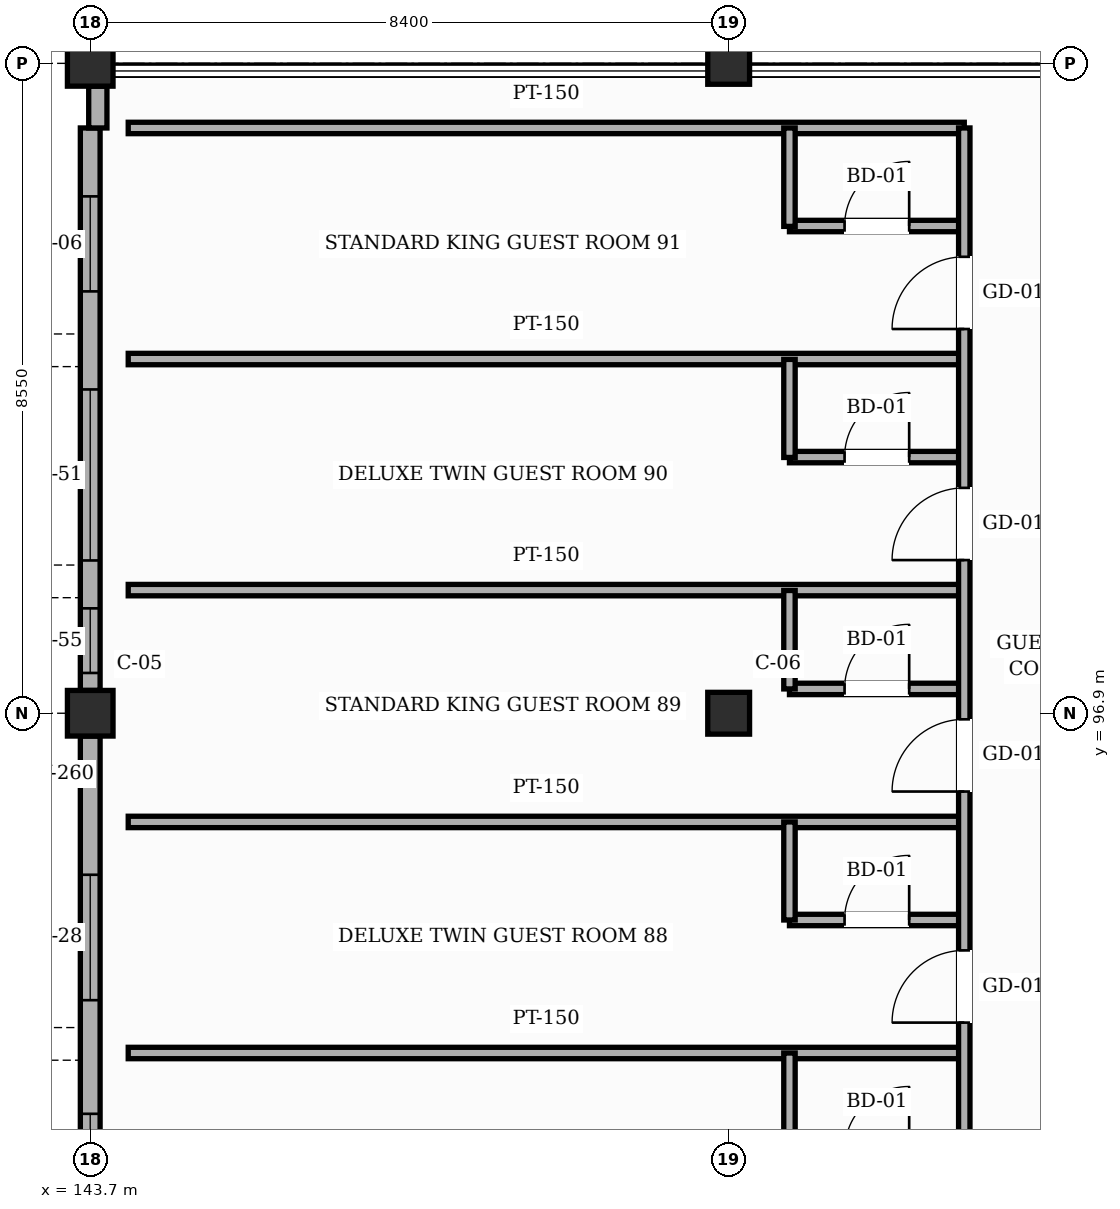
"""IFC4 building model, lengths in metres.
Left out: names, types, materials, properties, quantities, classifications, styles, units other than length and angle.
Written with IfcOpenShell. Run it as: python <this file> out.ifc"""

import sys

from ifc_helpers import new_model, si_unit, direction, frame, frame_2d, origin, origin_2d, place, context, subcontext, project, spatial, rectangle, hollow_rectangle, extrude, element, fill, save


model = new_model("IFC4")
c1 = context("Model", 3, precision=1e-05, world=origin(), true_north=direction((0.0, 1.0)))
c2 = subcontext(c1, "Body", "Model", "MODEL_VIEW")
j1 = project(units=[si_unit("LENGTHUNIT", "METRE"), si_unit("PLANEANGLEUNIT", "RADIAN")], contexts=[c1])
p1 = place(None, origin())
s1 = spatial("IfcSite", under=j1, at=p1, CompositionType="ELEMENT")
p2 = place(p1, origin())
s2 = spatial("IfcBuilding", under=s1, at=p2, CompositionType="ELEMENT")
p3 = place(p2, frame((0.0, 0.0, 24.6)))
s3 = spatial("IfcBuildingStorey", under=s2, at=p3, CompositionType="ELEMENT", Elevation=24.6)
for number, where, z_axis, x_axis in (
    (1, (143.7, 96.9, 0.0), (0.0, 0.0, 1.0), (1.0, 0.0, 0.0)),
    (2, (143.7, 105.45, 0.0), (0.0, 0.0, 1.0), (1.0, 0.0, 0.0)),
):
    element("IfcColumn", number, at=place(p3, frame(where, z_axis=z_axis, x_axis=x_axis)), inside=s3, PredefinedType="COLUMN", context=c2, shape_type="SweptSolid", body=[
        extrude(hollow_rectangle(XDim=0.6, YDim=0.6, WallThickness=0.025, InnerFilletRadius=0.025, OuterFilletRadius=0.05, at=origin_2d()), origin(), (0.0, 0.0, 1.0), 3.6),
    ])
for number, where, z_axis, x_axis in (
    (3, (152.1, 96.9, 0.0), (0.0, 0.0, 1.0), (1.0, 0.0, 0.0)),
    (4, (152.1, 105.45, 0.0), (0.0, 0.0, 1.0), (1.0, 0.0, 0.0)),
):
    element("IfcColumn", number, at=place(p3, frame(where, z_axis=z_axis, x_axis=x_axis)), inside=s3, PredefinedType="COLUMN", context=c2, shape_type="SweptSolid", body=[
        extrude(hollow_rectangle(XDim=0.55, YDim=0.55, WallThickness=0.022, InnerFilletRadius=0.022, OuterFilletRadius=0.044, at=origin_2d()), origin(), (0.0, 0.0, 1.0), 3.6),
    ])
p4 = place(p3, frame((143.7, 89.2, 0.0), z_axis=(0.0, 0.0, 1.0), x_axis=(0.0, 1.0, 0.0)))
e5 = element("IfcWall", 5, at=p4, inside=s3, PredefinedType="SOLIDWALL", context=c2, shape_type="SweptSolid", body=[
    extrude(rectangle(XDim=7.4, YDim=0.26, at=frame_2d((3.7, 0.0))), origin(), (0.0, 0.0, 1.0), 2.805),
])
p5 = place(p4, frame((0.98, 0.0, 0.85)))
e6 = element("IfcOpeningElement", 6, at=p5, cuts=e5, PredefinedType="OPENING", context=c2, shape_type="SweptSolid", body=[
    extrude(rectangle(XDim=1.45, YDim=1.65, at=frame_2d((0.725, 0.825))), frame((0.0, 0.14, 0.0), z_axis=(0.0, -1.0, 0.0), x_axis=(1.0, 0.0, 0.0)), (0.0, 0.0, 1.0), 0.28),
])
p6 = place(p4, frame((3.925, 0.0, 0.85)))
e7 = element("IfcOpeningElement", 7, at=p6, cuts=e5, PredefinedType="OPENING", context=c2, shape_type="SweptSolid", body=[
    extrude(rectangle(XDim=1.65, YDim=1.65, at=frame_2d((0.825, 0.825))), frame((0.0, 0.14, 0.0), z_axis=(0.0, -1.0, 0.0), x_axis=(1.0, 0.0, 0.0)), (0.0, 0.0, 1.0), 0.28),
])
p7 = place(p3, frame((143.7, 97.2, 0.0), z_axis=(0.0, 0.0, 1.0), x_axis=(0.0, 1.0, 0.0)))
e8 = element("IfcWall", 8, at=p7, inside=s3, PredefinedType="SOLIDWALL", context=c2, shape_type="SweptSolid", body=[
    extrude(rectangle(XDim=7.4, YDim=0.26, at=frame_2d((3.7, 0.0))), origin(), (0.0, 0.0, 1.0), 2.655),
])
p8 = place(p7, frame((0.23, 0.0, 0.85)))
e9 = element("IfcOpeningElement", 9, at=p8, cuts=e8, PredefinedType="OPENING", context=c2, shape_type="SweptSolid", body=[
    extrude(rectangle(XDim=0.85, YDim=1.35, at=frame_2d((0.425, 0.675))), frame((0.0, 0.14, 0.0), z_axis=(0.0, -1.0, 0.0), x_axis=(1.0, 0.0, 0.0)), (0.0, 0.0, 1.0), 0.28),
])
p9 = place(p7, frame((1.71, 0.0, 0.85)))
e10 = element("IfcOpeningElement", 10, at=p9, cuts=e8, PredefinedType="OPENING", context=c2, shape_type="SweptSolid", body=[
    extrude(rectangle(XDim=2.25, YDim=1.35, at=frame_2d((1.125, 0.675))), frame((0.0, 0.14, 0.0), z_axis=(0.0, -1.0, 0.0), x_axis=(1.0, 0.0, 0.0)), (0.0, 0.0, 1.0), 0.28),
])
p10 = place(p7, frame((5.25, 0.0, 0.85)))
e11 = element("IfcOpeningElement", 11, at=p10, cuts=e8, PredefinedType="OPENING", context=c2, shape_type="SweptSolid", body=[
    extrude(rectangle(XDim=1.25, YDim=1.35, at=frame_2d((0.625, 0.675))), frame((0.0, 0.14, 0.0), z_axis=(0.0, -1.0, 0.0), x_axis=(1.0, 0.0, 0.0)), (0.0, 0.0, 1.0), 0.28),
])
p11 = place(p3, frame((143.8, 104.6, 0.0), z_axis=(0.0, 0.0, 1.0), x_axis=(0.0, 1.0, 0.0)))
e12 = element("IfcWall", 12, at=p11, inside=s3, PredefinedType="SOLIDWALL", context=c2, shape_type="SweptSolid", body=[
    extrude(rectangle(XDim=0.55, YDim=0.24, at=frame_2d((0.275, 0.0))), origin(), (0.0, 0.0, 1.0), 2.655),
])
p12 = place(p3, frame((144.2, 92.43, 0.0), z_axis=(0.0, 0.0, 1.0), x_axis=(1.0, 0.0, 0.0)))
e13 = element("IfcWall", 13, at=p12, inside=s3, PredefinedType="PARTITIONING", context=c2, shape_type="SweptSolid", body=[
    extrude(rectangle(XDim=11.0, YDim=0.15, at=frame_2d((5.5, 0.0))), origin(), (0.0, 0.0, 1.0), 3.365),
])
p13 = place(p3, frame((152.9, 94.18, 0.0), z_axis=(0.0, 0.0, 1.0), x_axis=(1.0, 0.0, 0.0)))
e14 = element("IfcWall", 14, at=p13, inside=s3, PredefinedType="PARTITIONING", context=c2, shape_type="SweptSolid", body=[
    extrude(rectangle(XDim=2.3, YDim=0.15, at=frame_2d((1.15, 0.0))), origin(), (0.0, 0.0, 1.0), 3.365),
])
p14 = place(p13, frame((0.725, 0.0, 0.0)))
e15 = element("IfcOpeningElement", 15, at=p14, cuts=e14, PredefinedType="OPENING", context=c2, shape_type="SweptSolid", body=[
    extrude(rectangle(XDim=0.85, YDim=2.1, at=frame_2d((0.425, 1.05))), frame((0.0, 0.085, 0.0), z_axis=(0.0, -1.0, 0.0), x_axis=(1.0, 0.0, 0.0)), (0.0, 0.0, 1.0), 0.17),
])
p15 = place(p3, frame((144.2, 95.47, 0.0), z_axis=(0.0, 0.0, 1.0), x_axis=(1.0, 0.0, 0.0)))
e16 = element("IfcWall", 16, at=p15, inside=s3, PredefinedType="PARTITIONING", context=c2, shape_type="SweptSolid", body=[
    extrude(rectangle(XDim=11.0, YDim=0.15, at=frame_2d((5.5, 0.0))), origin(), (0.0, 0.0, 1.0), 3.365),
])
p16 = place(p3, frame((152.9, 97.22, 0.0), z_axis=(0.0, 0.0, 1.0), x_axis=(1.0, 0.0, 0.0)))
e17 = element("IfcWall", 17, at=p16, inside=s3, PredefinedType="PARTITIONING", context=c2, shape_type="SweptSolid", body=[
    extrude(rectangle(XDim=2.3, YDim=0.15, at=frame_2d((1.15, 0.0))), origin(), (0.0, 0.0, 1.0), 2.805),
])
p17 = place(p16, frame((0.725, 0.0, 0.0)))
e18 = element("IfcOpeningElement", 18, at=p17, cuts=e17, PredefinedType="OPENING", context=c2, shape_type="SweptSolid", body=[
    extrude(rectangle(XDim=0.85, YDim=2.1, at=frame_2d((0.425, 1.05))), frame((0.0, 0.085, 0.0), z_axis=(0.0, -1.0, 0.0), x_axis=(1.0, 0.0, 0.0)), (0.0, 0.0, 1.0), 0.17),
])
p18 = place(p3, frame((144.2, 98.52, 0.0), z_axis=(0.0, 0.0, 1.0), x_axis=(1.0, 0.0, 0.0)))
e19 = element("IfcWall", 19, at=p18, inside=s3, PredefinedType="PARTITIONING", context=c2, shape_type="SweptSolid", body=[
    extrude(rectangle(XDim=11.0, YDim=0.15, at=frame_2d((5.5, 0.0))), origin(), (0.0, 0.0, 1.0), 3.365),
])
p19 = place(p3, frame((152.9, 100.27, 0.0), z_axis=(0.0, 0.0, 1.0), x_axis=(1.0, 0.0, 0.0)))
e20 = element("IfcWall", 20, at=p19, inside=s3, PredefinedType="PARTITIONING", context=c2, shape_type="SweptSolid", body=[
    extrude(rectangle(XDim=2.3, YDim=0.15, at=frame_2d((1.15, 0.0))), origin(), (0.0, 0.0, 1.0), 3.365),
])
p20 = place(p19, frame((0.725, 0.0, 0.0)))
e21 = element("IfcOpeningElement", 21, at=p20, cuts=e20, PredefinedType="OPENING", context=c2, shape_type="SweptSolid", body=[
    extrude(rectangle(XDim=0.85, YDim=2.1, at=frame_2d((0.425, 1.05))), frame((0.0, 0.085, 0.0), z_axis=(0.0, -1.0, 0.0), x_axis=(1.0, 0.0, 0.0)), (0.0, 0.0, 1.0), 0.17),
])
p21 = place(p3, frame((144.2, 101.56, 0.0), z_axis=(0.0, 0.0, 1.0), x_axis=(1.0, 0.0, 0.0)))
e22 = element("IfcWall", 22, at=p21, inside=s3, PredefinedType="PARTITIONING", context=c2, shape_type="SweptSolid", body=[
    extrude(rectangle(XDim=11.0, YDim=0.15, at=frame_2d((5.5, 0.0))), origin(), (0.0, 0.0, 1.0), 3.365),
])
p22 = place(p3, frame((152.9, 103.31, 0.0), z_axis=(0.0, 0.0, 1.0), x_axis=(1.0, 0.0, 0.0)))
e23 = element("IfcWall", 23, at=p22, inside=s3, PredefinedType="PARTITIONING", context=c2, shape_type="SweptSolid", body=[
    extrude(rectangle(XDim=2.3, YDim=0.15, at=frame_2d((1.15, 0.0))), origin(), (0.0, 0.0, 1.0), 3.365),
])
p23 = place(p22, frame((0.725, 0.0, 0.0)))
e24 = element("IfcOpeningElement", 24, at=p23, cuts=e23, PredefinedType="OPENING", context=c2, shape_type="SweptSolid", body=[
    extrude(rectangle(XDim=0.85, YDim=2.1, at=frame_2d((0.425, 1.05))), frame((0.0, 0.085, 0.0), z_axis=(0.0, -1.0, 0.0), x_axis=(1.0, 0.0, 0.0)), (0.0, 0.0, 1.0), 0.17),
])
p24 = place(p3, frame((144.2, 104.6, 0.0), z_axis=(0.0, 0.0, 1.0), x_axis=(1.0, 0.0, 0.0)))
e25 = element("IfcWall", 25, at=p24, inside=s3, PredefinedType="PARTITIONING", context=c2, shape_type="SweptSolid", body=[
    extrude(rectangle(XDim=11.0, YDim=0.15, at=frame_2d((5.5, 0.0))), origin(), (0.0, 0.0, 1.0), 3.365),
])
p25 = place(p3, frame((152.9, 91.135, 0.0), z_axis=(0.0, 0.0, 1.0), x_axis=(0.0, 1.0, 0.0)))
e26 = element("IfcWall", 26, at=p25, inside=s3, PredefinedType="PARTITIONING", context=c2, shape_type="SweptSolid", body=[
    extrude(rectangle(XDim=1.295, YDim=0.15, at=frame_2d((0.647, 0.0))), origin(), (0.0, 0.0, 1.0), 3.365),
])
p26 = place(p3, frame((152.9, 94.18, 0.0), z_axis=(0.0, 0.0, 1.0), x_axis=(0.0, 1.0, 0.0)))
e27 = element("IfcWall", 27, at=p26, inside=s3, PredefinedType="PARTITIONING", context=c2, shape_type="SweptSolid", body=[
    extrude(rectangle(XDim=1.29, YDim=0.15, at=frame_2d((0.645, 0.0))), origin(), (0.0, 0.0, 1.0), 3.365),
])
p27 = place(p3, frame((152.9, 97.22, 0.0), z_axis=(0.0, 0.0, 1.0), x_axis=(0.0, 1.0, 0.0)))
e28 = element("IfcWall", 28, at=p27, inside=s3, PredefinedType="PARTITIONING", context=c2, shape_type="SweptSolid", body=[
    extrude(rectangle(XDim=1.295, YDim=0.15, at=frame_2d((0.647, 0.0))), origin(), (0.0, 0.0, 1.0), 3.365),
])
p28 = place(p3, frame((152.9, 100.265, 0.0), z_axis=(0.0, 0.0, 1.0), x_axis=(0.0, 1.0, 0.0)))
e29 = element("IfcWall", 29, at=p28, inside=s3, PredefinedType="PARTITIONING", context=c2, shape_type="SweptSolid", body=[
    extrude(rectangle(XDim=1.29, YDim=0.15, at=frame_2d((0.645, 0.0))), origin(), (0.0, 0.0, 1.0), 3.365),
])
p29 = place(p3, frame((152.9, 103.305, 0.0), z_axis=(0.0, 0.0, 1.0), x_axis=(0.0, 1.0, 0.0)))
e30 = element("IfcWall", 30, at=p29, inside=s3, PredefinedType="PARTITIONING", context=c2, shape_type="SweptSolid", body=[
    extrude(rectangle(XDim=1.295, YDim=0.15, at=frame_2d((0.647, 0.0))), origin(), (0.0, 0.0, 1.0), 3.365),
])
p30 = place(p3, frame((155.2, 62.0, 0.0), z_axis=(0.0, 0.0, 1.0), x_axis=(0.0, 1.0, 0.0)))
e31 = element("IfcWall", 31, at=p30, inside=s3, PredefinedType="PARTITIONING", context=c2, shape_type="SweptSolid", body=[
    extrude(rectangle(XDim=42.6, YDim=0.15, at=frame_2d((21.3, 0.0))), origin(), (0.0, 0.0, 1.0), 3.365),
])
p31 = place(p30, frame((0.4, 0.0, 0.0)))
e32 = element("IfcOpeningElement", 32, at=p31, cuts=e31, PredefinedType="OPENING", context=c2, shape_type="SweptSolid", body=[
    extrude(rectangle(XDim=0.95, YDim=2.15, at=frame_2d((0.475, 1.075))), frame((0.0, 0.085, 0.0), z_axis=(0.0, -1.0, 0.0), x_axis=(1.0, 0.0, 0.0)), (0.0, 0.0, 1.0), 0.17),
])
p32 = place(p30, frame((3.445, 0.0, 0.0)))
e33 = element("IfcOpeningElement", 33, at=p32, cuts=e31, PredefinedType="OPENING", context=c2, shape_type="SweptSolid", body=[
    extrude(rectangle(XDim=0.95, YDim=2.15, at=frame_2d((0.475, 1.075))), frame((0.0, 0.085, 0.0), z_axis=(0.0, -1.0, 0.0), x_axis=(1.0, 0.0, 0.0)), (0.0, 0.0, 1.0), 0.17),
])
p33 = place(p30, frame((6.485, 0.0, 0.0)))
e34 = element("IfcOpeningElement", 34, at=p33, cuts=e31, PredefinedType="OPENING", context=c2, shape_type="SweptSolid", body=[
    extrude(rectangle(XDim=0.95, YDim=2.15, at=frame_2d((0.475, 1.075))), frame((0.0, 0.085, 0.0), z_axis=(0.0, -1.0, 0.0), x_axis=(1.0, 0.0, 0.0)), (0.0, 0.0, 1.0), 0.17),
])
p34 = place(p30, frame((9.53, 0.0, 0.0)))
e35 = element("IfcOpeningElement", 35, at=p34, cuts=e31, PredefinedType="OPENING", context=c2, shape_type="SweptSolid", body=[
    extrude(rectangle(XDim=0.95, YDim=2.15, at=frame_2d((0.475, 1.075))), frame((0.0, 0.085, 0.0), z_axis=(0.0, -1.0, 0.0), x_axis=(1.0, 0.0, 0.0)), (0.0, 0.0, 1.0), 0.17),
])
p35 = place(p30, frame((12.57, 0.0, 0.0)))
e36 = element("IfcOpeningElement", 36, at=p35, cuts=e31, PredefinedType="OPENING", context=c2, shape_type="SweptSolid", body=[
    extrude(rectangle(XDim=0.95, YDim=2.15, at=frame_2d((0.475, 1.075))), frame((0.0, 0.085, 0.0), z_axis=(0.0, -1.0, 0.0), x_axis=(1.0, 0.0, 0.0)), (0.0, 0.0, 1.0), 0.17),
])
p36 = place(p30, frame((15.615, 0.0, 0.0)))
e37 = element("IfcOpeningElement", 37, at=p36, cuts=e31, PredefinedType="OPENING", context=c2, shape_type="SweptSolid", body=[
    extrude(rectangle(XDim=0.95, YDim=2.15, at=frame_2d((0.475, 1.075))), frame((0.0, 0.085, 0.0), z_axis=(0.0, -1.0, 0.0), x_axis=(1.0, 0.0, 0.0)), (0.0, 0.0, 1.0), 0.17),
])
p37 = place(p30, frame((18.655, 0.0, 0.0)))
e38 = element("IfcOpeningElement", 38, at=p37, cuts=e31, PredefinedType="OPENING", context=c2, shape_type="SweptSolid", body=[
    extrude(rectangle(XDim=0.95, YDim=2.15, at=frame_2d((0.475, 1.075))), frame((0.0, 0.085, 0.0), z_axis=(0.0, -1.0, 0.0), x_axis=(1.0, 0.0, 0.0)), (0.0, 0.0, 1.0), 0.17),
])
p38 = place(p30, frame((21.7, 0.0, 0.0)))
e39 = element("IfcOpeningElement", 39, at=p38, cuts=e31, PredefinedType="OPENING", context=c2, shape_type="SweptSolid", body=[
    extrude(rectangle(XDim=0.95, YDim=2.15, at=frame_2d((0.475, 1.075))), frame((0.0, 0.085, 0.0), z_axis=(0.0, -1.0, 0.0), x_axis=(1.0, 0.0, 0.0)), (0.0, 0.0, 1.0), 0.17),
])
p39 = place(p30, frame((24.745, 0.0, 0.0)))
e40 = element("IfcOpeningElement", 40, at=p39, cuts=e31, PredefinedType="OPENING", context=c2, shape_type="SweptSolid", body=[
    extrude(rectangle(XDim=0.95, YDim=2.15, at=frame_2d((0.475, 1.075))), frame((0.0, 0.085, 0.0), z_axis=(0.0, -1.0, 0.0), x_axis=(1.0, 0.0, 0.0)), (0.0, 0.0, 1.0), 0.17),
])
p40 = place(p30, frame((27.785, 0.0, 0.0)))
e41 = element("IfcOpeningElement", 41, at=p40, cuts=e31, PredefinedType="OPENING", context=c2, shape_type="SweptSolid", body=[
    extrude(rectangle(XDim=0.95, YDim=2.15, at=frame_2d((0.475, 1.075))), frame((0.0, 0.085, 0.0), z_axis=(0.0, -1.0, 0.0), x_axis=(1.0, 0.0, 0.0)), (0.0, 0.0, 1.0), 0.17),
])
p41 = place(p30, frame((30.83, 0.0, 0.0)))
e42 = element("IfcOpeningElement", 42, at=p41, cuts=e31, PredefinedType="OPENING", context=c2, shape_type="SweptSolid", body=[
    extrude(rectangle(XDim=0.95, YDim=2.15, at=frame_2d((0.475, 1.075))), frame((0.0, 0.085, 0.0), z_axis=(0.0, -1.0, 0.0), x_axis=(1.0, 0.0, 0.0)), (0.0, 0.0, 1.0), 0.17),
])
p42 = place(p30, frame((33.87, 0.0, 0.0)))
e43 = element("IfcOpeningElement", 43, at=p42, cuts=e31, PredefinedType="OPENING", context=c2, shape_type="SweptSolid", body=[
    extrude(rectangle(XDim=0.95, YDim=2.15, at=frame_2d((0.475, 1.075))), frame((0.0, 0.085, 0.0), z_axis=(0.0, -1.0, 0.0), x_axis=(1.0, 0.0, 0.0)), (0.0, 0.0, 1.0), 0.17),
])
p43 = place(p30, frame((36.915, 0.0, 0.0)))
e44 = element("IfcOpeningElement", 44, at=p43, cuts=e31, PredefinedType="OPENING", context=c2, shape_type="SweptSolid", body=[
    extrude(rectangle(XDim=0.95, YDim=2.15, at=frame_2d((0.475, 1.075))), frame((0.0, 0.085, 0.0), z_axis=(0.0, -1.0, 0.0), x_axis=(1.0, 0.0, 0.0)), (0.0, 0.0, 1.0), 0.17),
])
p44 = place(p30, frame((39.955, 0.0, 0.0)))
e45 = element("IfcOpeningElement", 45, at=p44, cuts=e31, PredefinedType="OPENING", context=c2, shape_type="SweptSolid", body=[
    extrude(rectangle(XDim=0.95, YDim=2.15, at=frame_2d((0.475, 1.075))), frame((0.0, 0.085, 0.0), z_axis=(0.0, -1.0, 0.0), x_axis=(1.0, 0.0, 0.0)), (0.0, 0.0, 1.0), 0.17),
])
p45 = place(p5, origin())
e46 = element("IfcWindow", 46, at=p45, inside=s3, PartitioningType="SINGLE_PANEL", PredefinedType="WINDOW", context=c2, shape_type="SweptSolid", body=[
    extrude(rectangle(XDim=1.45, YDim=1.65, at=frame_2d((0.725, 0.825))), frame((0.0, 0.03, 0.0), z_axis=(0.0, -1.0, 0.0), x_axis=(1.0, 0.0, 0.0)), (0.0, 0.0, 1.0), 0.06),
])
fill(e6, e46)
p46 = place(p6, origin())
e47 = element("IfcWindow", 47, at=p46, inside=s3, PartitioningType="SINGLE_PANEL", PredefinedType="WINDOW", context=c2, shape_type="SweptSolid", body=[
    extrude(rectangle(XDim=1.65, YDim=1.65, at=frame_2d((0.825, 0.825))), frame((0.0, 0.03, 0.0), z_axis=(0.0, -1.0, 0.0), x_axis=(1.0, 0.0, 0.0)), (0.0, 0.0, 1.0), 0.06),
])
fill(e7, e47)
p47 = place(p8, origin())
e48 = element("IfcWindow", 48, at=p47, inside=s3, PartitioningType="SINGLE_PANEL", PredefinedType="WINDOW", context=c2, shape_type="SweptSolid", body=[
    extrude(rectangle(XDim=0.85, YDim=1.35, at=frame_2d((0.425, 0.675))), frame((0.0, 0.03, 0.0), z_axis=(0.0, -1.0, 0.0), x_axis=(1.0, 0.0, 0.0)), (0.0, 0.0, 1.0), 0.06),
])
fill(e9, e48)
p48 = place(p9, origin())
e49 = element("IfcWindow", 49, at=p48, inside=s3, PartitioningType="SINGLE_PANEL", PredefinedType="WINDOW", context=c2, shape_type="SweptSolid", body=[
    extrude(rectangle(XDim=2.25, YDim=1.35, at=frame_2d((1.125, 0.675))), frame((0.0, 0.03, 0.0), z_axis=(0.0, -1.0, 0.0), x_axis=(1.0, 0.0, 0.0)), (0.0, 0.0, 1.0), 0.06),
])
fill(e10, e49)
p49 = place(p10, origin())
e50 = element("IfcWindow", 50, at=p49, inside=s3, PartitioningType="SINGLE_PANEL", PredefinedType="WINDOW", context=c2, shape_type="SweptSolid", body=[
    extrude(rectangle(XDim=1.25, YDim=1.35, at=frame_2d((0.625, 0.675))), frame((0.0, 0.03, 0.0), z_axis=(0.0, -1.0, 0.0), x_axis=(1.0, 0.0, 0.0)), (0.0, 0.0, 1.0), 0.06),
])
fill(e11, e50)
p50 = place(p41, origin())
e51 = element("IfcDoor", 51, at=p50, inside=s3, OperationType="SINGLE_SWING_LEFT", PredefinedType="DOOR", context=c2, shape_type="SweptSolid", body=[
    extrude(rectangle(XDim=0.95, YDim=2.15, at=frame_2d((0.475, 1.075))), frame((0.0, 0.025, 0.0), z_axis=(0.0, -1.0, 0.0), x_axis=(1.0, 0.0, 0.0)), (0.0, 0.0, 1.0), 0.05),
])
fill(e42, e51)
p51 = place(p14, origin())
e52 = element("IfcDoor", 52, at=p51, inside=s3, OperationType="SINGLE_SWING_RIGHT", PredefinedType="DOOR", context=c2, shape_type="SweptSolid", body=[
    extrude(rectangle(XDim=0.85, YDim=2.1, at=frame_2d((0.425, 1.05))), frame((0.0, 0.025, 0.0), z_axis=(0.0, -1.0, 0.0), x_axis=(1.0, 0.0, 0.0)), (0.0, 0.0, 1.0), 0.05),
])
fill(e15, e52)
p52 = place(p42, origin())
e53 = element("IfcDoor", 53, at=p52, inside=s3, OperationType="SINGLE_SWING_LEFT", PredefinedType="DOOR", context=c2, shape_type="SweptSolid", body=[
    extrude(rectangle(XDim=0.95, YDim=2.15, at=frame_2d((0.475, 1.075))), frame((0.0, 0.025, 0.0), z_axis=(0.0, -1.0, 0.0), x_axis=(1.0, 0.0, 0.0)), (0.0, 0.0, 1.0), 0.05),
])
fill(e43, e53)
p53 = place(p17, origin())
e54 = element("IfcDoor", 54, at=p53, inside=s3, OperationType="SINGLE_SWING_RIGHT", PredefinedType="DOOR", context=c2, shape_type="SweptSolid", body=[
    extrude(rectangle(XDim=0.85, YDim=2.1, at=frame_2d((0.425, 1.05))), frame((0.0, 0.025, 0.0), z_axis=(0.0, -1.0, 0.0), x_axis=(1.0, 0.0, 0.0)), (0.0, 0.0, 1.0), 0.05),
])
fill(e18, e54)
p54 = place(p43, origin())
e55 = element("IfcDoor", 55, at=p54, inside=s3, OperationType="SINGLE_SWING_LEFT", PredefinedType="DOOR", context=c2, shape_type="SweptSolid", body=[
    extrude(rectangle(XDim=0.95, YDim=2.15, at=frame_2d((0.475, 1.075))), frame((0.0, 0.025, 0.0), z_axis=(0.0, -1.0, 0.0), x_axis=(1.0, 0.0, 0.0)), (0.0, 0.0, 1.0), 0.05),
])
fill(e44, e55)
p55 = place(p20, origin())
e56 = element("IfcDoor", 56, at=p55, inside=s3, OperationType="SINGLE_SWING_RIGHT", PredefinedType="DOOR", context=c2, shape_type="SweptSolid", body=[
    extrude(rectangle(XDim=0.85, YDim=2.1, at=frame_2d((0.425, 1.05))), frame((0.0, 0.025, 0.0), z_axis=(0.0, -1.0, 0.0), x_axis=(1.0, 0.0, 0.0)), (0.0, 0.0, 1.0), 0.05),
])
fill(e21, e56)
p56 = place(p44, origin())
e57 = element("IfcDoor", 57, at=p56, inside=s3, OperationType="SINGLE_SWING_LEFT", PredefinedType="DOOR", context=c2, shape_type="SweptSolid", body=[
    extrude(rectangle(XDim=0.95, YDim=2.15, at=frame_2d((0.475, 1.075))), frame((0.0, 0.025, 0.0), z_axis=(0.0, -1.0, 0.0), x_axis=(1.0, 0.0, 0.0)), (0.0, 0.0, 1.0), 0.05),
])
fill(e45, e57)
p57 = place(p23, origin())
e58 = element("IfcDoor", 58, at=p57, inside=s3, OperationType="SINGLE_SWING_RIGHT", PredefinedType="DOOR", context=c2, shape_type="SweptSolid", body=[
    extrude(rectangle(XDim=0.85, YDim=2.1, at=frame_2d((0.425, 1.05))), frame((0.0, 0.025, 0.0), z_axis=(0.0, -1.0, 0.0), x_axis=(1.0, 0.0, 0.0)), (0.0, 0.0, 1.0), 0.05),
])
fill(e24, e58)
save(model, sys.argv[1])
